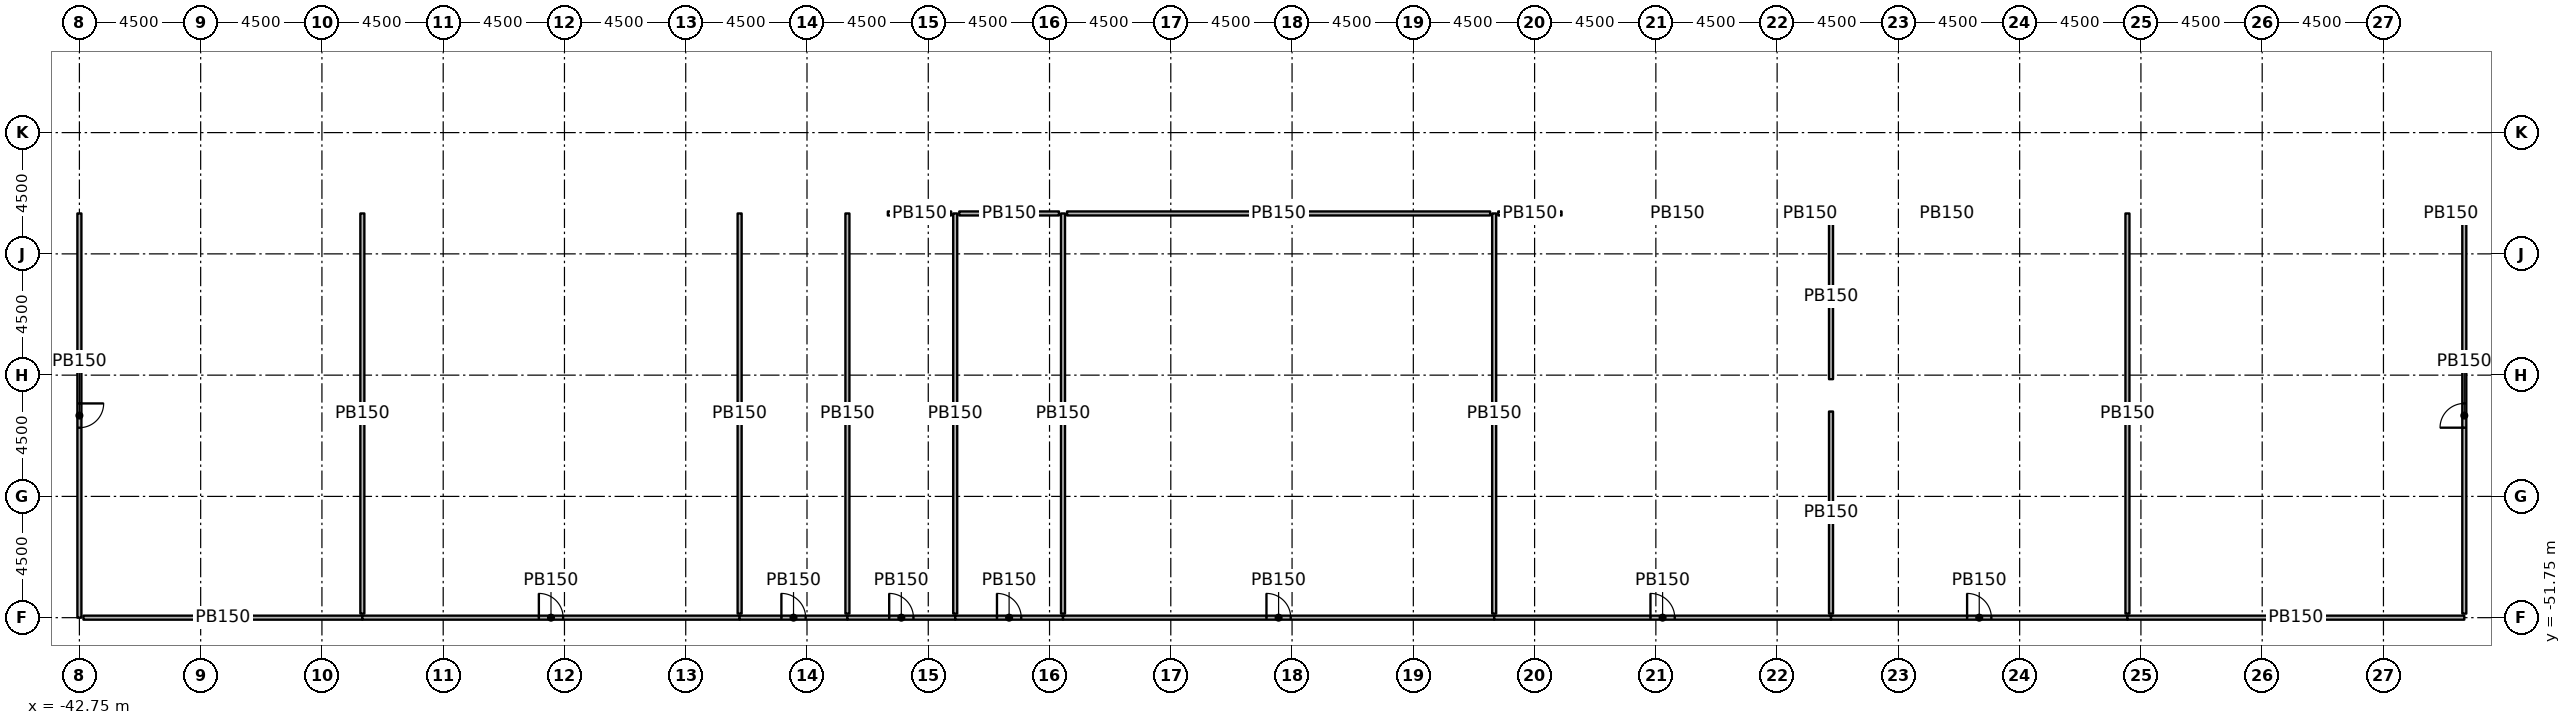
"""IFC4 building model, lengths in metres.
Left out: names, types, materials, properties, quantities, classifications, styles, units other than length and angle.
Written with IfcOpenShell. Run it as: python <this file> out.ifc"""

import sys

from ifc_helpers import new_model, si_unit, direction, frame, frame_2d, origin, origin_2d, place, context, subcontext, project, spatial, rectangle, extrude, element, fill, save


model = new_model("IFC4")
c1 = context("Model", 3, precision=1e-05, world=origin(), true_north=direction((0.0, 1.0)))
c2 = subcontext(c1, "Body", "Model", "MODEL_VIEW")
j1 = project(units=[si_unit("LENGTHUNIT", "METRE"), si_unit("PLANEANGLEUNIT", "RADIAN")], contexts=[c1])
p1 = place(None, origin())
s1 = spatial("IfcSite", under=j1, at=p1, CompositionType="ELEMENT")
p2 = place(p1, origin())
s2 = spatial("IfcBuilding", under=s1, at=p2, CompositionType="ELEMENT")
p3 = place(p2, frame((0.0, 0.0, -8.0)))
s3 = spatial("IfcBuildingStorey", under=s2, at=p3, CompositionType="ELEMENT", Elevation=-8.0)
for number, where, z_axis, x_axis in (
    (1, (-40.5, -43.5, 0.0), (0.0, 0.0, 1.0), (1.0, 0.0, 0.0)),
    (2, (-31.5, -43.5, 0.0), (0.0, 0.0, 1.0), (1.0, 0.0, 0.0)),
    (3, (-22.5, -43.5, 0.0), (0.0, 0.0, 1.0), (1.0, 0.0, 0.0)),
    (4, (-13.5, -43.5, 0.0), (0.0, 0.0, 1.0), (1.0, 0.0, 0.0)),
    (5, (-4.5, -43.5, 0.0), (0.0, 0.0, 1.0), (1.0, 0.0, 0.0)),
    (6, (-2.25, -33.11, 0.0), (0.0, 0.0, 1.0), (1.0, 0.0, 0.0)),
    (7, (2.25, -33.11, 0.0), (0.0, 0.0, 1.0), (1.0, 0.0, 0.0)),
    (8, (4.5, -43.5, 0.0), (0.0, 0.0, 1.0), (1.0, 0.0, 0.0)),
    (9, (13.5, -43.5, 0.0), (0.0, 0.0, 1.0), (1.0, 0.0, 0.0)),
    (10, (22.5, -43.5, 0.0), (0.0, 0.0, 1.0), (1.0, 0.0, 0.0)),
    (11, (31.5, -43.5, 0.0), (0.0, 0.0, 1.0), (1.0, 0.0, 0.0)),
    (12, (40.5, -43.5, 0.0), (0.0, 0.0, 1.0), (1.0, 0.0, 0.0)),
):
    element("IfcColumn", number, at=place(p3, frame(where, z_axis=z_axis, x_axis=x_axis)), inside=s3, PredefinedType="COLUMN", context=c2, shape_type="SweptSolid", body=[
        extrude(rectangle(XDim=1.2, YDim=1.2, at=origin_2d()), origin(), (0.0, 0.0, 1.0), 3.4),
    ])
p4 = place(p3, frame((-42.75, -36.75, 0.0), z_axis=(0.0, 0.0, 1.0), x_axis=(0.0, -1.0, 0.0)))
e13 = element("IfcWall", 13, at=p4, inside=s3, PredefinedType="PARTITIONING", context=c2, shape_type="SweptSolid", body=[
    extrude(rectangle(XDim=15.0, YDim=0.15, at=frame_2d((7.5, 0.0))), origin(), (0.0, 0.0, 1.0), 3.4),
])
p5 = place(p4, frame((7.05, 0.0, 0.0)))
e14 = element("IfcOpeningElement", 14, at=p5, cuts=e13, PredefinedType="OPENING", context=c2, shape_type="SweptSolid", body=[
    extrude(rectangle(XDim=0.9, YDim=2.1, at=frame_2d((0.45, 1.05))), frame((0.0, 0.085, 0.0), z_axis=(0.0, -1.0, 0.0), x_axis=(1.0, 0.0, 0.0)), (0.0, 0.0, 1.0), 0.17),
])
p6 = place(p3, frame((-42.6, -51.75, 0.0), z_axis=(0.0, 0.0, 1.0), x_axis=(1.0, 0.0, 0.0)))
e15 = element("IfcWall", 15, at=p6, inside=s3, PredefinedType="PARTITIONING", context=c2, shape_type="SweptSolid", body=[
    extrude(rectangle(XDim=10.35, YDim=0.15, at=frame_2d((5.175, 0.0))), origin(), (0.0, 0.0, 1.0), 3.4),
])
p7 = place(p3, frame((-32.25, -51.75, 0.0), z_axis=(0.0, 0.0, 1.0), x_axis=(1.0, 0.0, 0.0)))
e16 = element("IfcWall", 16, at=p7, inside=s3, PredefinedType="PARTITIONING", context=c2, shape_type="SweptSolid", body=[
    extrude(rectangle(XDim=14.0, YDim=0.15, at=frame_2d((7.0, 0.0))), origin(), (0.0, 0.0, 1.0), 3.4),
])
p8 = place(p7, frame((6.55, 0.0, 0.0)))
e17 = element("IfcOpeningElement", 17, at=p8, cuts=e16, PredefinedType="OPENING", context=c2, shape_type="SweptSolid", body=[
    extrude(rectangle(XDim=0.9, YDim=2.1, at=frame_2d((0.45, 1.05))), frame((0.0, 0.085, 0.0), z_axis=(0.0, -1.0, 0.0), x_axis=(1.0, 0.0, 0.0)), (0.0, 0.0, 1.0), 0.17),
])
p9 = place(p3, frame((-18.25, -51.75, 0.0), z_axis=(0.0, 0.0, 1.0), x_axis=(1.0, 0.0, 0.0)))
e18 = element("IfcWall", 18, at=p9, inside=s3, PredefinedType="PARTITIONING", context=c2, shape_type="SweptSolid", body=[
    extrude(rectangle(XDim=4.0, YDim=0.15, at=frame_2d((2.0, 0.0))), origin(), (0.0, 0.0, 1.0), 3.4),
])
p10 = place(p9, frame((1.55, 0.0, 0.0)))
e19 = element("IfcOpeningElement", 19, at=p10, cuts=e18, PredefinedType="OPENING", context=c2, shape_type="SweptSolid", body=[
    extrude(rectangle(XDim=0.9, YDim=2.1, at=frame_2d((0.45, 1.05))), frame((0.0, 0.085, 0.0), z_axis=(0.0, -1.0, 0.0), x_axis=(1.0, 0.0, 0.0)), (0.0, 0.0, 1.0), 0.17),
])
p11 = place(p3, frame((-14.25, -51.75, 0.0), z_axis=(0.0, 0.0, 1.0), x_axis=(1.0, 0.0, 0.0)))
e20 = element("IfcWall", 20, at=p11, inside=s3, PredefinedType="PARTITIONING", context=c2, shape_type="SweptSolid", body=[
    extrude(rectangle(XDim=4.0, YDim=0.15, at=frame_2d((2.0, 0.0))), origin(), (0.0, 0.0, 1.0), 3.4),
])
p12 = place(p11, frame((1.55, 0.0, 0.0)))
e21 = element("IfcOpeningElement", 21, at=p12, cuts=e20, PredefinedType="OPENING", context=c2, shape_type="SweptSolid", body=[
    extrude(rectangle(XDim=0.9, YDim=2.1, at=frame_2d((0.45, 1.05))), frame((0.0, 0.085, 0.0), z_axis=(0.0, -1.0, 0.0), x_axis=(1.0, 0.0, 0.0)), (0.0, 0.0, 1.0), 0.17),
])
p13 = place(p3, frame((-10.25, -51.75, 0.0), z_axis=(0.0, 0.0, 1.0), x_axis=(1.0, 0.0, 0.0)))
e22 = element("IfcWall", 22, at=p13, inside=s3, PredefinedType="PARTITIONING", context=c2, shape_type="SweptSolid", body=[
    extrude(rectangle(XDim=4.0, YDim=0.15, at=frame_2d((2.0, 0.0))), origin(), (0.0, 0.0, 1.0), 3.4),
])
p14 = place(p13, frame((1.55, 0.0, 0.0)))
e23 = element("IfcOpeningElement", 23, at=p14, cuts=e22, PredefinedType="OPENING", context=c2, shape_type="SweptSolid", body=[
    extrude(rectangle(XDim=0.9, YDim=2.1, at=frame_2d((0.45, 1.05))), frame((0.0, 0.085, 0.0), z_axis=(0.0, -1.0, 0.0), x_axis=(1.0, 0.0, 0.0)), (0.0, 0.0, 1.0), 0.17),
])
p15 = place(p3, frame((-6.25, -51.75, 0.0), z_axis=(0.0, 0.0, 1.0), x_axis=(1.0, 0.0, 0.0)))
e24 = element("IfcWall", 24, at=p15, inside=s3, PredefinedType="PARTITIONING", context=c2, shape_type="SweptSolid", body=[
    extrude(rectangle(XDim=16.0, YDim=0.15, at=frame_2d((8.0, 0.0))), origin(), (0.0, 0.0, 1.0), 3.4),
])
p16 = place(p15, frame((7.55, 0.0, 0.0)))
e25 = element("IfcOpeningElement", 25, at=p16, cuts=e24, PredefinedType="OPENING", context=c2, shape_type="SweptSolid", body=[
    extrude(rectangle(XDim=0.9, YDim=2.1, at=frame_2d((0.45, 1.05))), frame((0.0, 0.085, 0.0), z_axis=(0.0, -1.0, 0.0), x_axis=(1.0, 0.0, 0.0)), (0.0, 0.0, 1.0), 0.17),
])
p17 = place(p3, frame((9.75, -51.75, 0.0), z_axis=(0.0, 0.0, 1.0), x_axis=(1.0, 0.0, 0.0)))
e26 = element("IfcWall", 26, at=p17, inside=s3, PredefinedType="PARTITIONING", context=c2, shape_type="SweptSolid", body=[
    extrude(rectangle(XDim=12.5, YDim=0.15, at=frame_2d((6.25, 0.0))), origin(), (0.0, 0.0, 1.0), 3.4),
])
p18 = place(p17, frame((5.8, 0.0, 0.0)))
e27 = element("IfcOpeningElement", 27, at=p18, cuts=e26, PredefinedType="OPENING", context=c2, shape_type="SweptSolid", body=[
    extrude(rectangle(XDim=0.9, YDim=2.1, at=frame_2d((0.45, 1.05))), frame((0.0, 0.085, 0.0), z_axis=(0.0, -1.0, 0.0), x_axis=(1.0, 0.0, 0.0)), (0.0, 0.0, 1.0), 0.17),
])
p19 = place(p3, frame((22.25, -51.75, 0.0), z_axis=(0.0, 0.0, 1.0), x_axis=(1.0, 0.0, 0.0)))
e28 = element("IfcWall", 28, at=p19, inside=s3, PredefinedType="PARTITIONING", context=c2, shape_type="SweptSolid", body=[
    extrude(rectangle(XDim=11.0, YDim=0.15, at=frame_2d((5.5, 0.0))), origin(), (0.0, 0.0, 1.0), 3.4),
])
p20 = place(p19, frame((5.05, 0.0, 0.0)))
e29 = element("IfcOpeningElement", 29, at=p20, cuts=e28, PredefinedType="OPENING", context=c2, shape_type="SweptSolid", body=[
    extrude(rectangle(XDim=0.9, YDim=2.1, at=frame_2d((0.45, 1.05))), frame((0.0, 0.085, 0.0), z_axis=(0.0, -1.0, 0.0), x_axis=(1.0, 0.0, 0.0)), (0.0, 0.0, 1.0), 0.17),
])
p21 = place(p3, frame((33.25, -51.75, 0.0), z_axis=(0.0, 0.0, 1.0), x_axis=(1.0, 0.0, 0.0)))
e30 = element("IfcWall", 30, at=p21, inside=s3, PredefinedType="PARTITIONING", context=c2, shape_type="SweptSolid", body=[
    extrude(rectangle(XDim=12.5, YDim=0.15, at=frame_2d((6.25, 0.0))), origin(), (0.0, 0.0, 1.0), 3.4),
])
for number, where, z_axis, x_axis in (
    (31, (-32.25, -36.75, 0.0), (0.0, 0.0, 1.0), (0.0, -1.0, 0.0)),
    (32, (-18.25, -36.75, 0.0), (0.0, 0.0, 1.0), (0.0, -1.0, 0.0)),
    (33, (-14.25, -36.75, 0.0), (0.0, 0.0, 1.0), (0.0, -1.0, 0.0)),
    (34, (-10.25, -36.75, 0.0), (0.0, 0.0, 1.0), (0.0, -1.0, 0.0)),
):
    element("IfcWall", number, at=place(p3, frame(where, z_axis=z_axis, x_axis=x_axis)), inside=s3, PredefinedType="PARTITIONING", context=c2, shape_type="SweptSolid", body=[
        extrude(rectangle(XDim=14.85, YDim=0.15, at=frame_2d((7.425, 0.0))), origin(), (0.0, 0.0, 1.0), 3.4),
    ])
p22 = place(p3, frame((-12.75, -36.75, 0.0), z_axis=(0.0, 0.0, 1.0), x_axis=(1.0, 0.0, 0.0)))
e35 = element("IfcWall", 35, at=p22, inside=s3, PredefinedType="PARTITIONING", context=c2, shape_type="SweptSolid", body=[
    extrude(rectangle(XDim=2.35, YDim=0.15, at=frame_2d((1.175, 0.0))), origin(), (0.0, 0.0, 1.0), 3.4),
])
p23 = place(p3, frame((-6.25, -36.75, 0.0), z_axis=(0.0, 0.0, 1.0), x_axis=(0.0, -1.0, 0.0)))
e36 = element("IfcWall", 36, at=p23, inside=s3, PredefinedType="PARTITIONING", context=c2, shape_type="SweptSolid", body=[
    extrude(rectangle(XDim=14.85, YDim=0.15, at=frame_2d((7.425, 0.0))), origin(), (0.0, 0.0, 1.0), 3.4),
])
p24 = place(p3, frame((-10.1, -36.75, 0.0), z_axis=(0.0, 0.0, 1.0), x_axis=(1.0, 0.0, 0.0)))
e37 = element("IfcWall", 37, at=p24, inside=s3, PredefinedType="PARTITIONING", context=c2, shape_type="SweptSolid", body=[
    extrude(rectangle(XDim=3.7, YDim=0.15, at=frame_2d((1.85, 0.0))), origin(), (0.0, 0.0, 1.0), 3.4),
])
p25 = place(p3, frame((9.75, -36.75, 0.0), z_axis=(0.0, 0.0, 1.0), x_axis=(0.0, -1.0, 0.0)))
e38 = element("IfcWall", 38, at=p25, inside=s3, PredefinedType="PARTITIONING", context=c2, shape_type="SweptSolid", body=[
    extrude(rectangle(XDim=14.85, YDim=0.15, at=frame_2d((7.425, 0.0))), origin(), (0.0, 0.0, 1.0), 3.4),
])
p26 = place(p3, frame((-6.1, -36.75, 0.0), z_axis=(0.0, 0.0, 1.0), x_axis=(1.0, 0.0, 0.0)))
e39 = element("IfcWall", 39, at=p26, inside=s3, PredefinedType="PARTITIONING", context=c2, shape_type="SweptSolid", body=[
    extrude(rectangle(XDim=15.7, YDim=0.15, at=frame_2d((7.85, 0.0))), origin(), (0.0, 0.0, 1.0), 3.4),
])
p27 = place(p3, frame((22.25, -36.75, 0.0), z_axis=(0.0, 0.0, 1.0), x_axis=(0.0, -1.0, 0.0)))
e40 = element("IfcWall", 40, at=p27, inside=s3, PredefinedType="PARTITIONING", context=c2, shape_type="SweptSolid", body=[
    extrude(rectangle(XDim=6.15, YDim=0.15, at=frame_2d((3.075, 0.0))), origin(), (0.0, 0.0, 1.0), 3.4),
])
p28 = place(p3, frame((22.25, -44.1, 0.0), z_axis=(0.0, 0.0, 1.0), x_axis=(0.0, -1.0, 0.0)))
e41 = element("IfcWall", 41, at=p28, inside=s3, PredefinedType="PARTITIONING", context=c2, shape_type="SweptSolid", body=[
    extrude(rectangle(XDim=7.5, YDim=0.15, at=frame_2d((3.75, 0.0))), origin(), (0.0, 0.0, 1.0), 3.4),
])
p29 = place(p3, frame((9.9, -36.75, 0.0), z_axis=(0.0, 0.0, 1.0), x_axis=(1.0, 0.0, 0.0)))
e42 = element("IfcWall", 42, at=p29, inside=s3, PredefinedType="PARTITIONING", context=c2, shape_type="SweptSolid", body=[
    extrude(rectangle(XDim=2.35, YDim=0.15, at=frame_2d((1.175, 0.0))), origin(), (0.0, 0.0, 1.0), 3.4),
])
p30 = place(p3, frame((15.85, -36.75, 0.0), z_axis=(0.0, 0.0, 1.0), x_axis=(1.0, 0.0, 0.0)))
e43 = element("IfcWall", 43, at=p30, inside=s3, PredefinedType="PARTITIONING", context=c2, shape_type="SweptSolid", body=[
    extrude(rectangle(XDim=1.4, YDim=0.15, at=frame_2d((0.7, 0.0))), origin(), (0.0, 0.0, 1.0), 3.4),
])
p31 = place(p3, frame((20.85, -36.75, 0.0), z_axis=(0.0, 0.0, 1.0), x_axis=(1.0, 0.0, 0.0)))
e44 = element("IfcWall", 44, at=p31, inside=s3, PredefinedType="PARTITIONING", context=c2, shape_type="SweptSolid", body=[
    extrude(rectangle(XDim=1.25, YDim=0.15, at=frame_2d((0.625, 0.0))), origin(), (0.0, 0.0, 1.0), 3.4),
])
p32 = place(p3, frame((33.25, -36.75, 0.0), z_axis=(0.0, 0.0, 1.0), x_axis=(0.0, -1.0, 0.0)))
e45 = element("IfcWall", 45, at=p32, inside=s3, PredefinedType="PARTITIONING", context=c2, shape_type="SweptSolid", body=[
    extrude(rectangle(XDim=14.85, YDim=0.15, at=frame_2d((7.425, 0.0))), origin(), (0.0, 0.0, 1.0), 3.4),
])
p33 = place(p3, frame((25.85, -36.75, 0.0), z_axis=(0.0, 0.0, 1.0), x_axis=(1.0, 0.0, 0.0)))
e46 = element("IfcWall", 46, at=p33, inside=s3, PredefinedType="PARTITIONING", context=c2, shape_type="SweptSolid", body=[
    extrude(rectangle(XDim=1.4, YDim=0.15, at=frame_2d((0.7, 0.0))), origin(), (0.0, 0.0, 1.0), 3.4),
])
p34 = place(p3, frame((44.75, -36.75, 0.0), z_axis=(0.0, 0.0, 1.0), x_axis=(1.0, 0.0, 0.0)))
e47 = element("IfcWall", 47, at=p34, inside=s3, PredefinedType="PARTITIONING", context=c2, shape_type="SweptSolid", body=[
    extrude(rectangle(XDim=1.0, YDim=0.15, at=frame_2d((0.5, 0.0))), origin(), (0.0, 0.0, 1.0), 3.4),
])
p35 = place(p3, frame((45.75, -51.6, 0.0), z_axis=(0.0, 0.0, 1.0), x_axis=(0.0, 1.0, 0.0)))
e48 = element("IfcWall", 48, at=p35, inside=s3, PredefinedType="PARTITIONING", context=c2, shape_type="SweptSolid", body=[
    extrude(rectangle(XDim=14.7, YDim=0.15, at=frame_2d((7.35, 0.0))), origin(), (0.0, 0.0, 1.0), 3.4),
])
p36 = place(p35, frame((6.9, 0.0, 0.0)))
e49 = element("IfcOpeningElement", 49, at=p36, cuts=e48, PredefinedType="OPENING", context=c2, shape_type="SweptSolid", body=[
    extrude(rectangle(XDim=0.9, YDim=2.1, at=frame_2d((0.45, 1.05))), frame((0.0, 0.085, 0.0), z_axis=(0.0, -1.0, 0.0), x_axis=(1.0, 0.0, 0.0)), (0.0, 0.0, 1.0), 0.17),
])
p37 = place(p5, origin())
e50 = element("IfcDoor", 50, at=p37, inside=s3, OperationType="SINGLE_SWING_LEFT", PredefinedType="DOOR", context=c2, shape_type="SweptSolid", body=[
    extrude(rectangle(XDim=0.9, YDim=2.1, at=frame_2d((0.45, 1.05))), frame((0.0, 0.025, 0.0), z_axis=(0.0, -1.0, 0.0), x_axis=(1.0, 0.0, 0.0)), (0.0, 0.0, 1.0), 0.05),
])
fill(e14, e50)
p38 = place(p8, origin())
e51 = element("IfcDoor", 51, at=p38, inside=s3, OperationType="SINGLE_SWING_LEFT", PredefinedType="DOOR", context=c2, shape_type="SweptSolid", body=[
    extrude(rectangle(XDim=0.9, YDim=2.1, at=frame_2d((0.45, 1.05))), frame((0.0, 0.025, 0.0), z_axis=(0.0, -1.0, 0.0), x_axis=(1.0, 0.0, 0.0)), (0.0, 0.0, 1.0), 0.05),
])
fill(e17, e51)
p39 = place(p10, origin())
e52 = element("IfcDoor", 52, at=p39, inside=s3, OperationType="SINGLE_SWING_LEFT", PredefinedType="DOOR", context=c2, shape_type="SweptSolid", body=[
    extrude(rectangle(XDim=0.9, YDim=2.1, at=frame_2d((0.45, 1.05))), frame((0.0, 0.025, 0.0), z_axis=(0.0, -1.0, 0.0), x_axis=(1.0, 0.0, 0.0)), (0.0, 0.0, 1.0), 0.05),
])
fill(e19, e52)
p40 = place(p12, origin())
e53 = element("IfcDoor", 53, at=p40, inside=s3, OperationType="SINGLE_SWING_LEFT", PredefinedType="DOOR", context=c2, shape_type="SweptSolid", body=[
    extrude(rectangle(XDim=0.9, YDim=2.1, at=frame_2d((0.45, 1.05))), frame((0.0, 0.025, 0.0), z_axis=(0.0, -1.0, 0.0), x_axis=(1.0, 0.0, 0.0)), (0.0, 0.0, 1.0), 0.05),
])
fill(e21, e53)
p41 = place(p14, origin())
e54 = element("IfcDoor", 54, at=p41, inside=s3, OperationType="SINGLE_SWING_LEFT", PredefinedType="DOOR", context=c2, shape_type="SweptSolid", body=[
    extrude(rectangle(XDim=0.9, YDim=2.1, at=frame_2d((0.45, 1.05))), frame((0.0, 0.025, 0.0), z_axis=(0.0, -1.0, 0.0), x_axis=(1.0, 0.0, 0.0)), (0.0, 0.0, 1.0), 0.05),
])
fill(e23, e54)
p42 = place(p16, origin())
e55 = element("IfcDoor", 55, at=p42, inside=s3, OperationType="SINGLE_SWING_LEFT", PredefinedType="DOOR", context=c2, shape_type="SweptSolid", body=[
    extrude(rectangle(XDim=0.9, YDim=2.1, at=frame_2d((0.45, 1.05))), frame((0.0, 0.025, 0.0), z_axis=(0.0, -1.0, 0.0), x_axis=(1.0, 0.0, 0.0)), (0.0, 0.0, 1.0), 0.05),
])
fill(e25, e55)
p43 = place(p18, origin())
e56 = element("IfcDoor", 56, at=p43, inside=s3, OperationType="SINGLE_SWING_LEFT", PredefinedType="DOOR", context=c2, shape_type="SweptSolid", body=[
    extrude(rectangle(XDim=0.9, YDim=2.1, at=frame_2d((0.45, 1.05))), frame((0.0, 0.025, 0.0), z_axis=(0.0, -1.0, 0.0), x_axis=(1.0, 0.0, 0.0)), (0.0, 0.0, 1.0), 0.05),
])
fill(e27, e56)
p44 = place(p20, origin())
e57 = element("IfcDoor", 57, at=p44, inside=s3, OperationType="SINGLE_SWING_LEFT", PredefinedType="DOOR", context=c2, shape_type="SweptSolid", body=[
    extrude(rectangle(XDim=0.9, YDim=2.1, at=frame_2d((0.45, 1.05))), frame((0.0, 0.025, 0.0), z_axis=(0.0, -1.0, 0.0), x_axis=(1.0, 0.0, 0.0)), (0.0, 0.0, 1.0), 0.05),
])
fill(e29, e57)
p45 = place(p36, origin())
e58 = element("IfcDoor", 58, at=p45, inside=s3, OperationType="SINGLE_SWING_LEFT", PredefinedType="DOOR", context=c2, shape_type="SweptSolid", body=[
    extrude(rectangle(XDim=0.9, YDim=2.1, at=frame_2d((0.45, 1.05))), frame((0.0, 0.025, 0.0), z_axis=(0.0, -1.0, 0.0), x_axis=(1.0, 0.0, 0.0)), (0.0, 0.0, 1.0), 0.05),
])
fill(e49, e58)
save(model, sys.argv[1])
